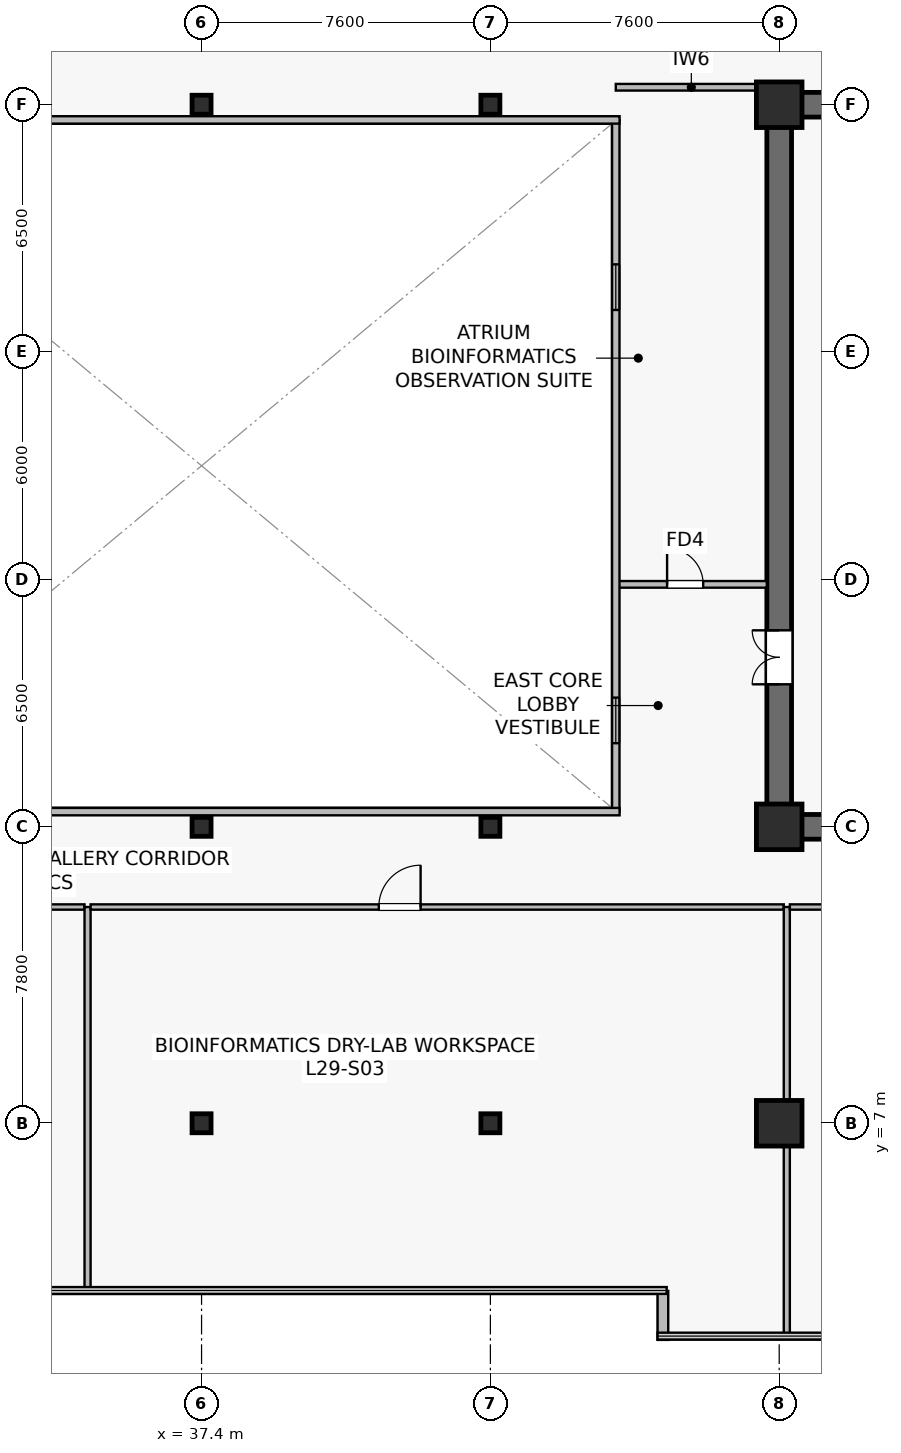
"""IFC4 building model, lengths in metres.
Left out: names, types, materials, properties, quantities, classifications, styles, units other than length and angle.
Written with IfcOpenShell. Run it as: python <this file> out.ifc"""

import sys

from ifc_helpers import new_model, si_unit, direction, frame, frame_2d, origin, origin_2d, place, context, subcontext, project, spatial, rectangle, hollow_rectangle, extrude, source, transform, mapped, element, fill, save


model = new_model("IFC4")
c1 = context("Model", 3, precision=1e-05, world=origin(), true_north=direction((0.0, 1.0)))
c2 = subcontext(c1, "Body", "Model", "MODEL_VIEW")
j1 = project(units=[si_unit("LENGTHUNIT", "METRE"), si_unit("PLANEANGLEUNIT", "RADIAN")], contexts=[c1])
p1 = place(None, origin())
s1 = spatial("IfcSite", under=j1, at=p1, CompositionType="ELEMENT")
p2 = place(p1, origin())
s2 = spatial("IfcBuilding", under=s1, at=p2, CompositionType="ELEMENT")
p3 = place(p2, frame((0.0, 0.0, 121.5)))
s3 = spatial("IfcBuildingStorey", under=s2, at=p3, CompositionType="ELEMENT", Elevation=121.5)
p4 = place(p3, frame((52.275, 14.8, 0.0), z_axis=(0.0, 0.0, 1.0), x_axis=(1.0, 0.0, 0.0)))
e1 = element("IfcWall", 1, at=p4, inside=s3, PredefinedType="SHEAR", context=c2, shape_type="SweptSolid", body=[
    extrude(rectangle(XDim=15.45, YDim=0.65, at=frame_2d((7.725, 0.0))), origin(), (0.0, 0.0, 1.0), 3.79),
])
p5 = place(p3, frame((52.275, 33.8, 0.0), z_axis=(0.0, 0.0, 1.0), x_axis=(1.0, 0.0, 0.0)))
e2 = element("IfcWall", 2, at=p5, inside=s3, PredefinedType="SHEAR", context=c2, shape_type="SweptSolid", body=[
    extrude(rectangle(XDim=15.45, YDim=0.65, at=frame_2d((7.725, 0.0))), origin(), (0.0, 0.0, 1.0), 3.79),
])
p6 = place(p5, frame((9.25, 0.0, 0.0)))
e3 = element("IfcOpeningElement", 3, at=p6, cuts=e2, PredefinedType="OPENING", context=c2, shape_type="SweptSolid", body=[
    extrude(rectangle(XDim=0.95, YDim=2.15, at=frame_2d((0.475, 1.075))), frame((0.0, 0.335, 0.0), z_axis=(0.0, -1.0, 0.0), x_axis=(1.0, 0.0, 0.0)), (0.0, 0.0, 1.0), 0.67),
])
p7 = place(p5, frame((6.735, 0.0, 0.0)))
e4 = element("IfcOpeningElement", 4, at=p7, cuts=e2, PredefinedType="OPENING", context=c2, shape_type="SweptSolid", body=[
    extrude(rectangle(XDim=0.95, YDim=2.15, at=frame_2d((0.475, 1.075))), frame((0.0, 0.335, 0.0), z_axis=(0.0, -1.0, 0.0), x_axis=(1.0, 0.0, 0.0)), (0.0, 0.0, 1.0), 0.67),
])
p8 = place(p5, frame((4.185, 0.0, 0.0)))
e5 = element("IfcOpeningElement", 5, at=p8, cuts=e2, PredefinedType="OPENING", context=c2, shape_type="SweptSolid", body=[
    extrude(rectangle(XDim=0.95, YDim=2.15, at=frame_2d((0.475, 1.075))), frame((0.0, 0.335, 0.0), z_axis=(0.0, -1.0, 0.0), x_axis=(1.0, 0.0, 0.0)), (0.0, 0.0, 1.0), 0.67),
])
p9 = place(p5, frame((1.635, 0.0, 0.0)))
e6 = element("IfcOpeningElement", 6, at=p9, cuts=e2, PredefinedType="OPENING", context=c2, shape_type="SweptSolid", body=[
    extrude(rectangle(XDim=0.95, YDim=2.15, at=frame_2d((0.475, 1.075))), frame((0.0, 0.335, 0.0), z_axis=(0.0, -1.0, 0.0), x_axis=(1.0, 0.0, 0.0)), (0.0, 0.0, 1.0), 0.67),
])
p10 = place(p3, frame((52.6, 15.125, 0.0), z_axis=(0.0, 0.0, 1.0), x_axis=(0.0, 1.0, 0.0)))
e7 = element("IfcWall", 7, at=p10, inside=s3, PredefinedType="SHEAR", context=c2, shape_type="SweptSolid", body=[
    extrude(rectangle(XDim=18.35, YDim=0.65, at=frame_2d((9.175, 0.0))), origin(), (0.0, 0.0, 1.0), 3.79),
])
p11 = place(p10, frame((3.425, 0.0, 0.0)))
e8 = element("IfcOpeningElement", 8, at=p11, cuts=e7, PredefinedType="OPENING", context=c2, shape_type="SweptSolid", body=[
    extrude(rectangle(XDim=1.42, YDim=2.2, at=frame_2d((0.71, 1.1))), frame((0.0, 0.335, 0.0), z_axis=(0.0, -1.0, 0.0), x_axis=(1.0, 0.0, 0.0)), (0.0, 0.0, 1.0), 0.67),
])
m1 = source(origin(), c2, "Body", "SweptSolid", [
    extrude(rectangle(XDim=1.2, YDim=1.2, at=origin_2d()), origin(), (0.0, 0.0, 1.0), 4.1),
])
for number, where, z_axis, x_axis in (
    (9, (52.6, 7.0, 0.0), (0.0, 0.0, 1.0), (1.0, 0.0, 0.0)),
    (10, (52.6, 14.8, 0.0), (0.0, 0.0, 1.0), (1.0, 0.0, 0.0)),
    (11, (52.6, 33.8, 0.0), (0.0, 0.0, 1.0), (1.0, 0.0, 0.0)),
):
    element("IfcColumn", number, at=place(p3, frame(where, z_axis=z_axis, x_axis=x_axis)), inside=s3, PredefinedType="COLUMN", context=c2, shape_type="MappedRepresentation", body=[
        mapped(m1, transform((0.0, 0.0, 0.0), scale=1.0)),
    ])
m2 = source(origin(), c2, "Body", "SweptSolid", [
    extrude(hollow_rectangle(XDim=0.5, YDim=0.5, WallThickness=0.022, at=origin_2d()), origin(), (0.0, 0.0, 1.0), 4.1),
])
for number, where, z_axis, x_axis in (
    (12, (37.4, 7.0, 0.0), (0.0, 0.0, 1.0), (1.0, 0.0, 0.0)),
    (13, (37.4, 14.8, 0.0), (0.0, 0.0, 1.0), (1.0, 0.0, 0.0)),
    (14, (37.4, 33.8, 0.0), (0.0, 0.0, 1.0), (1.0, 0.0, 0.0)),
    (15, (45.0, 7.0, 0.0), (0.0, 0.0, 1.0), (1.0, 0.0, 0.0)),
    (16, (45.0, 14.8, 0.0), (0.0, 0.0, 1.0), (1.0, 0.0, 0.0)),
    (17, (45.0, 33.8, 0.0), (0.0, 0.0, 1.0), (1.0, 0.0, 0.0)),
):
    element("IfcColumn", number, at=place(p3, frame(where, z_axis=z_axis, x_axis=x_axis)), inside=s3, PredefinedType="COLUMN", context=c2, shape_type="MappedRepresentation", body=[
        mapped(m2, transform((0.0, 0.0, 0.0), scale=1.0)),
    ])
p12 = place(p3, frame((49.54, 2.588, 0.0), z_axis=(0.0, 0.0, 1.0), x_axis=(0.0, -1.0, 0.0)))
e18 = element("IfcWall", 18, at=p12, inside=s3, PredefinedType="STANDARD", context=c2, shape_type="SweptSolid", body=[
    extrude(rectangle(XDim=1.288, YDim=0.28, at=frame_2d((0.644, 0.0))), origin(), (0.0, 0.0, 1.0), 3.79),
])
p13 = place(p3, frame((48.3, 34.26, 0.0), z_axis=(0.0, 0.0, 1.0), x_axis=(1.0, 0.0, 0.0)))
e19 = element("IfcWall", 19, at=p13, inside=s3, PredefinedType="PARTITIONING", context=c2, shape_type="SweptSolid", body=[
    extrude(rectangle(XDim=3.975, YDim=0.175, at=frame_2d((1.987, 0.0))), origin(), (0.0, 0.0, 1.0), 3.475),
])
p14 = place(p3, frame((48.3, 21.18, 0.0), z_axis=(0.0, 0.0, 1.0), x_axis=(1.0, 0.0, 0.0)))
e20 = element("IfcWall", 20, at=p14, inside=s3, PredefinedType="PARTITIONING", context=c2, shape_type="SweptSolid", body=[
    extrude(rectangle(XDim=3.975, YDim=0.175, at=frame_2d((1.987, 0.0))), origin(), (0.0, 0.0, 1.0), 3.79),
])
p15 = place(p14, frame((1.35, 0.0, 0.0)))
e21 = element("IfcOpeningElement", 21, at=p15, cuts=e20, PredefinedType="OPENING", context=c2, shape_type="SweptSolid", body=[
    extrude(rectangle(XDim=0.95, YDim=2.15, at=frame_2d((0.475, 1.075))), frame((0.0, 0.098, 0.0), z_axis=(0.0, -1.0, 0.0), x_axis=(1.0, 0.0, 0.0)), (0.0, 0.0, 1.0), 0.195),
])
p16 = place(p3, frame((48.3, 15.2, 0.0), z_axis=(0.0, 0.0, 1.0), x_axis=(0.0, 1.0, 0.0)))
e22 = element("IfcWall", 22, at=p16, inside=s3, PredefinedType="SOLIDWALL", context=c2, shape_type="SweptSolid", body=[
    extrude(rectangle(XDim=18.2, YDim=0.195, at=frame_2d((9.1, 0.0))), origin(), (0.0, 0.0, 1.0), 3.79),
])
p17 = place(p16, frame((1.8, 0.0, 0.9)))
e23 = element("IfcOpeningElement", 23, at=p17, cuts=e22, PredefinedType="OPENING", context=c2, shape_type="SweptSolid", body=[
    extrude(rectangle(XDim=1.2, YDim=1.35, at=frame_2d((0.6, 0.675))), frame((0.0, 0.107, 0.0), z_axis=(0.0, -1.0, 0.0), x_axis=(1.0, 0.0, 0.0)), (0.0, 0.0, 1.0), 0.215),
])
p18 = place(p16, frame((13.2, 0.0, 0.9)))
e24 = element("IfcOpeningElement", 24, at=p18, cuts=e22, PredefinedType="OPENING", context=c2, shape_type="SweptSolid", body=[
    extrude(rectangle(XDim=1.2, YDim=1.35, at=frame_2d((0.6, 0.675))), frame((0.0, 0.107, 0.0), z_axis=(0.0, -1.0, 0.0), x_axis=(1.0, 0.0, 0.0)), (0.0, 0.0, 1.0), 0.215),
])
for number, where, z_axis, x_axis in (
    (25, (26.4, 15.2, 0.0), (0.0, 0.0, 1.0), (1.0, 0.0, 0.0)),
    (26, (26.4, 33.4, 0.0), (0.0, 0.0, 1.0), (1.0, 0.0, 0.0)),
):
    element("IfcWall", number, at=place(p3, frame(where, z_axis=z_axis, x_axis=x_axis)), inside=s3, PredefinedType="SOLIDWALL", context=c2, shape_type="SweptSolid", body=[
        extrude(rectangle(XDim=22.0, YDim=0.195, at=frame_2d((11.0, 0.0))), origin(), (0.0, 0.0, 1.0), 3.79),
    ])
p19 = place(p3, frame((16.08, 12.69, 0.0), z_axis=(0.0, 0.0, 1.0), x_axis=(1.0, 0.0, 0.0)))
e27 = element("IfcWall", 27, at=p19, inside=s3, PredefinedType="PARTITIONING", context=c2, shape_type="SweptSolid", body=[
    extrude(rectangle(XDim=18.24, YDim=0.14, at=frame_2d((9.12, 0.0))), origin(), (0.0, 0.0, 1.0), 3.125),
])
p20 = place(p19, frame((9.556, 0.0, 0.0)))
e28 = element("IfcOpeningElement", 28, at=p20, cuts=e27, PredefinedType="OPENING", context=c2, shape_type="SweptSolid", body=[
    extrude(rectangle(XDim=1.1, YDim=2.18, at=frame_2d((0.55, 1.09))), frame((0.0, 0.08, 0.0), z_axis=(0.0, -1.0, 0.0), x_axis=(1.0, 0.0, 0.0)), (0.0, 0.0, 1.0), 0.16),
])
p21 = place(p3, frame((34.4, 2.61, 0.0), z_axis=(0.0, 0.0, 1.0), x_axis=(0.0, 1.0, 0.0)))
e29 = element("IfcWall", 29, at=p21, inside=s3, PredefinedType="PARTITIONING", context=c2, shape_type="SweptSolid", body=[
    extrude(rectangle(XDim=10.08, YDim=0.16, at=frame_2d((5.04, 0.0))), origin(), (0.0, 0.0, 1.0), 3.075),
])
p22 = place(p3, frame((34.48, 12.69, 0.0), z_axis=(0.0, 0.0, 1.0), x_axis=(1.0, 0.0, 0.0)))
e30 = element("IfcWall", 30, at=p22, inside=s3, PredefinedType="PARTITIONING", context=c2, shape_type="SweptSolid", body=[
    extrude(rectangle(XDim=18.24, YDim=0.14, at=frame_2d((9.12, 0.0))), origin(), (0.0, 0.0, 1.0), 3.125),
])
p23 = place(p22, frame((7.583, 0.0, 0.0)))
e31 = element("IfcOpeningElement", 31, at=p23, cuts=e30, PredefinedType="OPENING", context=c2, shape_type="SweptSolid", body=[
    extrude(rectangle(XDim=1.1, YDim=2.18, at=frame_2d((0.55, 1.09))), frame((0.0, 0.08, 0.0), z_axis=(0.0, -1.0, 0.0), x_axis=(1.0, 0.0, 0.0)), (0.0, 0.0, 1.0), 0.16),
])
p24 = place(p3, frame((52.8, 1.41, 0.0), z_axis=(0.0, 0.0, 1.0), x_axis=(0.0, 1.0, 0.0)))
e32 = element("IfcWall", 32, at=p24, inside=s3, PredefinedType="PARTITIONING", context=c2, shape_type="SweptSolid", body=[
    extrude(rectangle(XDim=11.28, YDim=0.16, at=frame_2d((5.64, 0.0))), origin(), (0.0, 0.0, 1.0), 3.075),
])
p25 = place(p3, frame((52.88, 12.69, 0.0), z_axis=(0.0, 0.0, 1.0), x_axis=(1.0, 0.0, 0.0)))
e33 = element("IfcWall", 33, at=p25, inside=s3, PredefinedType="PARTITIONING", context=c2, shape_type="SweptSolid", body=[
    extrude(rectangle(XDim=14.94, YDim=0.14, at=frame_2d((7.47, 0.0))), origin(), (0.0, 0.0, 1.0), 3.125),
])
p26 = place(p25, frame((7.708, 0.0, 0.0)))
e34 = element("IfcOpeningElement", 34, at=p26, cuts=e33, PredefinedType="OPENING", context=c2, shape_type="SweptSolid", body=[
    extrude(rectangle(XDim=1.1, YDim=2.18, at=frame_2d((0.55, 1.09))), frame((0.0, 0.08, 0.0), z_axis=(0.0, -1.0, 0.0), x_axis=(1.0, 0.0, 0.0)), (0.0, 0.0, 1.0), 0.16),
])
m3 = source(origin(), c2, "Body", "SweptSolid", [
    extrude(rectangle(XDim=1.2, YDim=1.35, at=frame_2d((0.6, 0.675))), frame((0.0, 0.03, 0.0), z_axis=(0.0, -1.0, 0.0), x_axis=(1.0, 0.0, 0.0)), (0.0, 0.0, 1.0), 0.06),
])
p27 = place(p17, origin())
e35 = element("IfcWindow", 35, at=p27, inside=s3, PartitioningType="SINGLE_PANEL", PredefinedType="WINDOW", context=c2, shape_type="MappedRepresentation", body=[
    mapped(m3, transform((0.0, 0.0, 0.0), scale=1.0)),
])
fill(e23, e35)
p28 = place(p18, origin())
e36 = element("IfcWindow", 36, at=p28, inside=s3, PartitioningType="SINGLE_PANEL", PredefinedType="WINDOW", context=c2, shape_type="MappedRepresentation", body=[
    mapped(m3, transform((0.0, 0.0, 0.0), scale=1.0)),
])
fill(e24, e36)
m4 = source(origin(), c2, "Body", "SweptSolid", [
    extrude(rectangle(XDim=1.42, YDim=2.2, at=frame_2d((0.71, 1.1))), frame((0.0, 0.025, 0.0), z_axis=(0.0, -1.0, 0.0), x_axis=(1.0, 0.0, 0.0)), (0.0, 0.0, 1.0), 0.05),
])
p29 = place(p11, origin())
e37 = element("IfcDoor", 37, at=p29, inside=s3, OperationType="DOUBLE_DOOR_SINGLE_SWING", PredefinedType="DOOR", context=c2, shape_type="MappedRepresentation", body=[
    mapped(m4, transform((0.0, 0.0, 0.0), scale=1.0)),
])
fill(e8, e37)
m5 = source(origin(), c2, "Body", "SweptSolid", [
    extrude(rectangle(XDim=0.95, YDim=2.15, at=frame_2d((0.475, 1.075))), frame((0.0, 0.025, 0.0), z_axis=(0.0, -1.0, 0.0), x_axis=(1.0, 0.0, 0.0)), (0.0, 0.0, 1.0), 0.05),
])
p30 = place(p15, origin())
e38 = element("IfcDoor", 38, at=p30, inside=s3, OperationType="SINGLE_SWING_LEFT", PredefinedType="DOOR", context=c2, shape_type="MappedRepresentation", body=[
    mapped(m5, transform((0.0, 0.0, 0.0), scale=1.0)),
])
fill(e21, e38)
m6 = source(origin(), c2, "Body", "SweptSolid", [
    extrude(rectangle(XDim=1.1, YDim=2.18, at=frame_2d((0.55, 1.09))), frame((0.0, 0.025, 0.0), z_axis=(0.0, -1.0, 0.0), x_axis=(1.0, 0.0, 0.0)), (0.0, 0.0, 1.0), 0.05),
])
p31 = place(p23, origin())
e39 = element("IfcDoor", 39, at=p31, inside=s3, OperationType="SINGLE_SWING_RIGHT", PredefinedType="DOOR", context=c2, shape_type="MappedRepresentation", body=[
    mapped(m6, transform((0.0, 0.0, 0.0), scale=1.0)),
])
fill(e31, e39)
save(model, sys.argv[1])
